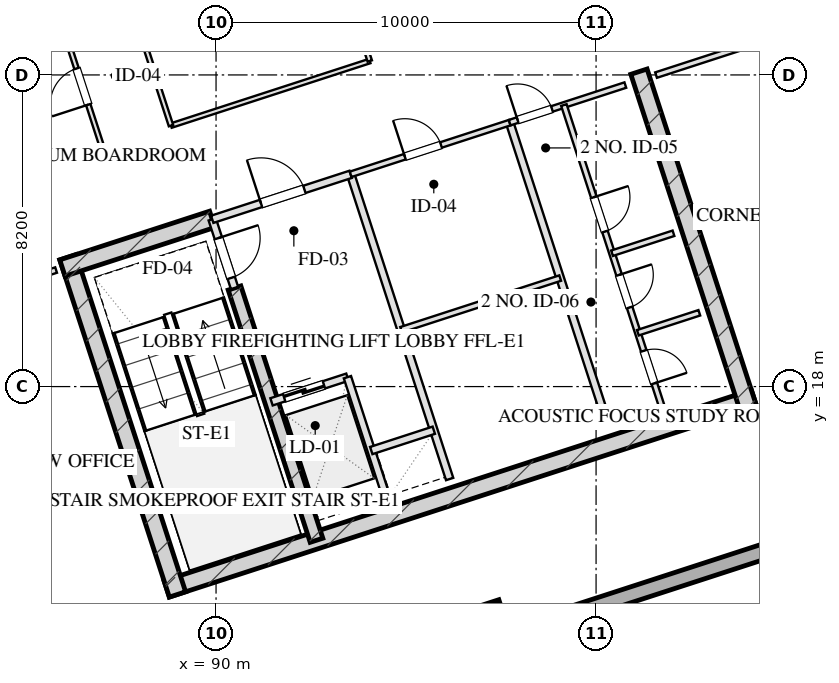
"""IFC4 building model, lengths in metres.
Left out: names, types, materials, properties, quantities, classifications, styles, units other than length and angle.
Written with IfcOpenShell. Run it as: python <this file> out.ifc"""

import sys

from ifc_helpers import new_model, si_unit, direction, frame, frame_2d, origin, origin_2d, place, context, subcontext, project, spatial, rectangle, hollow_rectangle, extrude, element, fill, save


model = new_model("IFC4")
c1 = context("Model", 3, precision=1e-05, world=origin(), true_north=direction((0.0, 1.0)))
c2 = subcontext(c1, "Body", "Model", "MODEL_VIEW")
j1 = project(units=[si_unit("LENGTHUNIT", "METRE"), si_unit("PLANEANGLEUNIT", "RADIAN")], contexts=[c1])
p1 = place(None, origin())
s1 = spatial("IfcSite", under=j1, at=p1, CompositionType="ELEMENT")
p2 = place(p1, origin())
s2 = spatial("IfcBuilding", under=s1, at=p2, CompositionType="ELEMENT")
p3 = place(p2, frame((0.0, 0.0, 192.05)))
s3 = spatial("IfcBuildingStorey", under=s2, at=p3, CompositionType="ELEMENT", Elevation=192.05)
p4 = place(p3, frame((88.701, 12.675, 0.0), z_axis=(0.0, 0.0, 1.0), x_axis=(0.95105824505, 0.309011673763, 0.0)))
e1 = element("IfcWall", 1, at=p4, inside=s3, PredefinedType="SHEAR", context=c2, shape_type="SweptSolid", body=[
    extrude(rectangle(XDim=16.25, YDim=0.45, at=frame_2d((8.125, 0.0))), origin(), (0.0, 0.0, 1.0), 3.45),
])
for number, where, z_axis, x_axis in (
    (2, (86.102, 21.404, 0.0), (0.0, 0.0, 1.0), (0.309, -0.951, 0.0)),
    (3, (101.128, 26.286, 0.0), (0.0, 0.0, 1.0), (0.309, -0.951, 0.0)),
):
    element("IfcWall", number, at=place(p3, frame(where, z_axis=z_axis, x_axis=x_axis)), inside=s3, PredefinedType="SHEAR", context=c2, shape_type="SweptSolid", body=[
        extrude(rectangle(XDim=9.33, YDim=0.45, at=frame_2d((4.665, 0.0))), origin(), (0.0, 0.0, 1.0), 3.45),
    ])
p5 = place(p3, frame((90.486, 20.594, 0.0), z_axis=(0.0, 0.0, 1.0), x_axis=(0.309020428229, -0.951055400562, 0.0)))
e4 = element("IfcWall", 4, at=p5, inside=s3, PredefinedType="SHEAR", context=c2, shape_type="SweptSolid", body=[
    extrude(rectangle(XDim=6.98, YDim=0.35, at=frame_2d((3.49, 0.0))), origin(), (0.0, 0.0, 1.0), 3.45),
])
p6 = place(p3, frame((85.957, 21.12, 0.0), z_axis=(0.0, 0.0, 1.0), x_axis=(0.951064796122, 0.308991510526, 0.0)))
e5 = element("IfcWall", 5, at=p6, inside=s3, PredefinedType="SHEAR", context=c2, shape_type="SweptSolid", body=[
    extrude(rectangle(XDim=4.145, YDim=0.45, at=frame_2d((2.073, 0.0))), origin(), (0.0, 0.0, 1.0), 3.45),
])
p7 = place(p3, frame((97.185, 11.888, 0.0), z_axis=(0.0, 0.0, 1.0), x_axis=(0.951056516295, 0.309016994375, 0.0)))
e6 = element("IfcColumn", 6, at=p7, inside=s3, PredefinedType="COLUMN", context=c2, shape_type="SweptSolid", body=[
    extrude(hollow_rectangle(XDim=0.8, YDim=0.8, WallThickness=0.028, at=origin_2d()), origin(), (0.0, 0.0, 1.0), 3.451),
])
p8 = place(p3, frame((98.224, 59.173, 0.0), z_axis=(0.0, 0.0, 1.0), x_axis=(0.309014228706, -0.951057414911, 0.0)))
e7 = element("IfcWall", 7, at=p8, inside=s3, PredefinedType="SOLIDWALL", context=c2, shape_type="SweptSolid", body=[
    extrude(rectangle(XDim=42.8, YDim=0.4, at=frame_2d((21.4, 0.0))), origin(), (0.0, 0.0, 1.0), 2.61),
])
p9 = place(p8, frame((26.75, 0.0, 0.75)))
e8 = element("IfcOpeningElement", 8, at=p9, cuts=e7, PredefinedType="OPENING", context=c2, shape_type="SweptSolid", body=[
    extrude(rectangle(XDim=2.1, YDim=1.46, at=frame_2d((1.05, 0.73))), frame((0.0, 0.21, 0.0), z_axis=(0.0, -1.0, 0.0), x_axis=(1.0, 0.0, 0.0)), (0.0, 0.0, 1.0), 0.42),
])
p10 = place(p8, frame((22.95, 0.0, 0.75)))
e9 = element("IfcOpeningElement", 9, at=p10, cuts=e7, PredefinedType="OPENING", context=c2, shape_type="SweptSolid", body=[
    extrude(rectangle(XDim=2.1, YDim=1.46, at=frame_2d((1.05, 0.73))), frame((0.0, 0.21, 0.0), z_axis=(0.0, -1.0, 0.0), x_axis=(1.0, 0.0, 0.0)), (0.0, 0.0, 1.0), 0.42),
])
p11 = place(p8, frame((17.75, 0.0, 0.75)))
e10 = element("IfcOpeningElement", 10, at=p11, cuts=e7, PredefinedType="OPENING", context=c2, shape_type="SweptSolid", body=[
    extrude(rectangle(XDim=2.1, YDim=1.46, at=frame_2d((1.05, 0.73))), frame((0.0, 0.21, 0.0), z_axis=(0.0, -1.0, 0.0), x_axis=(1.0, 0.0, 0.0)), (0.0, 0.0, 1.0), 0.42),
])
p12 = place(p8, frame((13.95, 0.0, 0.75)))
e11 = element("IfcOpeningElement", 11, at=p12, cuts=e7, PredefinedType="OPENING", context=c2, shape_type="SweptSolid", body=[
    extrude(rectangle(XDim=2.1, YDim=1.46, at=frame_2d((1.05, 0.73))), frame((0.0, 0.21, 0.0), z_axis=(0.0, -1.0, 0.0), x_axis=(1.0, 0.0, 0.0)), (0.0, 0.0, 1.0), 0.42),
])
p13 = place(p3, frame((109.908, 15.444, 0.0), z_axis=(0.0, 0.0, 1.0), x_axis=(-0.951057580055, -0.30901372044, 0.0)))
e12 = element("IfcWall", 12, at=p13, inside=s3, PredefinedType="SOLIDWALL", context=c2, shape_type="SweptSolid", body=[
    extrude(rectangle(XDim=26.4, YDim=0.4, at=frame_2d((13.2, 0.0))), origin(), (0.0, 0.0, 1.0), 2.61),
])
p14 = place(p3, frame((89.899, 22.401, 0.0), z_axis=(0.0, 0.0, 1.0), x_axis=(0.308932062672, -0.951084108086, 0.0)))
e13 = element("IfcWall", 13, at=p14, inside=s3, PredefinedType="PARTITIONING", context=c2, shape_type="SweptSolid", body=[
    extrude(rectangle(XDim=1.9, YDim=0.2, at=frame_2d((0.95, 0.0))), origin(), (0.0, 0.0, 1.0), 3.175),
])
p15 = place(p14, frame((0.52, 0.0, 0.0)))
e14 = element("IfcOpeningElement", 14, at=p15, cuts=e13, PredefinedType="OPENING", context=c2, shape_type="SweptSolid", body=[
    extrude(rectangle(XDim=1.1, YDim=2.05, at=frame_2d((0.55, 1.025))), frame((0.0, 0.11, 0.0), z_axis=(0.0, -1.0, 0.0), x_axis=(1.0, 0.0, 0.0)), (0.0, 0.0, 1.0), 0.22),
])
p16 = place(p3, frame((93.542, 23.585, 0.0), z_axis=(0.0, 0.0, 1.0), x_axis=(0.309042196757, -0.951048327176, 0.0)))
e15 = element("IfcWall", 15, at=p16, inside=s3, PredefinedType="PARTITIONING", context=c2, shape_type="SweptSolid", body=[
    extrude(rectangle(XDim=8.43, YDim=0.2, at=frame_2d((4.215, 0.0))), origin(), (0.0, 0.0, 1.0), 3.175),
])
p17 = place(p3, frame((89.899, 22.401, 0.0), z_axis=(0.0, 0.0, 1.0), x_axis=(0.951046716504, 0.309047153403, 0.0)))
e16 = element("IfcWall", 16, at=p17, inside=s3, PredefinedType="PARTITIONING", context=c2, shape_type="SweptSolid", body=[
    extrude(rectangle(XDim=3.83, YDim=0.2, at=frame_2d((1.915, 0.0))), origin(), (0.0, 0.0, 1.0), 3.175),
])
p18 = place(p17, frame((1.35, 0.0, 0.0)))
e17 = element("IfcOpeningElement", 17, at=p18, cuts=e16, PredefinedType="OPENING", context=c2, shape_type="SweptSolid", body=[
    extrude(rectangle(XDim=1.2, YDim=2.05, at=frame_2d((0.6, 1.025))), frame((0.0, 0.11, 0.0), z_axis=(0.0, -1.0, 0.0), x_axis=(1.0, 0.0, 0.0)), (0.0, 0.0, 1.0), 0.22),
])
p19 = place(p3, frame((91.46, 17.598, 0.0), z_axis=(0.0, 0.0, 1.0), x_axis=(0.951062257173, 0.308999325213, 0.0)))
e18 = element("IfcWall", 18, at=p19, inside=s3, PredefinedType="PARTITIONING", context=c2, shape_type="SweptSolid", body=[
    extrude(rectangle(XDim=2.1, YDim=0.2, at=frame_2d((1.05, 0.0))), origin(), (0.0, 0.0, 1.0), 3.175),
])
p20 = place(p19, frame((0.35, 0.0, 0.0)))
e19 = element("IfcOpeningElement", 19, at=p20, cuts=e18, PredefinedType="OPENING", context=c2, shape_type="SweptSolid", body=[
    extrude(rectangle(XDim=1.1, YDim=2.05, at=frame_2d((0.55, 1.025))), frame((0.0, 0.11, 0.0), z_axis=(0.0, -1.0, 0.0), x_axis=(1.0, 0.0, 0.0)), (0.0, 0.0, 1.0), 0.22),
])
p21 = place(p3, frame((93.457, 18.247, 0.0), z_axis=(0.0, 0.0, 1.0), x_axis=(0.3089935693, -0.951064127245, 0.0)))
e20 = element("IfcWall", 20, at=p21, inside=s3, PredefinedType="PARTITIONING", context=c2, shape_type="SweptSolid", body=[
    extrude(rectangle(XDim=3.7, YDim=0.2, at=frame_2d((1.85, 0.0))), origin(), (0.0, 0.0, 1.0), 3.175),
])
p22 = place(p3, frame((94.084, 16.317, 0.0), z_axis=(0.0, 0.0, 1.0), x_axis=(0.951041328149, 0.309063734775, 0.0)))
e21 = element("IfcWall", 21, at=p22, inside=s3, PredefinedType="PARTITIONING", context=c2, shape_type="SweptSolid", body=[
    extrude(rectangle(XDim=1.73, YDim=0.2, at=frame_2d((0.865, 0.0))), origin(), (0.0, 0.0, 1.0), 3.175),
])
p23 = place(p3, frame((97.727, 24.944, 0.0), z_axis=(0.0, 0.0, 1.0), x_axis=(0.309016001439, -0.951056838919, 0.0)))
e22 = element("IfcWall", 22, at=p23, inside=s3, PredefinedType="PARTITIONING", context=c2, shape_type="SweptSolid", body=[
    extrude(rectangle(XDim=8.43, YDim=0.2, at=frame_2d((4.215, 0.0))), origin(), (0.0, 0.0, 1.0), 3.175),
])
p24 = place(p3, frame((93.542, 23.585, 0.0), z_axis=(0.0, 0.0, 1.0), x_axis=(0.951063829732, 0.308994485023, 0.0)))
e23 = element("IfcWall", 23, at=p24, inside=s3, PredefinedType="PARTITIONING", context=c2, shape_type="SweptSolid", body=[
    extrude(rectangle(XDim=4.4, YDim=0.15, at=frame_2d((2.2, 0.0))), origin(), (0.0, 0.0, 1.0), 3.175),
])
p25 = place(p24, frame((1.5, 0.0, 0.0)))
e24 = element("IfcOpeningElement", 24, at=p25, cuts=e23, PredefinedType="OPENING", context=c2, shape_type="SweptSolid", body=[
    extrude(rectangle(XDim=1.0, YDim=2.05, at=frame_2d((0.5, 1.025))), frame((0.0, 0.085, 0.0), z_axis=(0.0, -1.0, 0.0), x_axis=(1.0, 0.0, 0.0)), (0.0, 0.0, 1.0), 0.17),
])
p26 = place(p3, frame((94.871, 19.495, 0.0), z_axis=(0.0, 0.0, 1.0), x_axis=(0.951042223598, 0.309060979314, 0.0)))
e25 = element("IfcWall", 25, at=p26, inside=s3, PredefinedType="PARTITIONING", context=c2, shape_type="SweptSolid", body=[
    extrude(rectangle(XDim=4.4, YDim=0.15, at=frame_2d((2.2, 0.0))), origin(), (0.0, 0.0, 1.0), 3.175),
])
p27 = place(p3, frame((97.727, 24.944, 0.0), z_axis=(0.0, 0.0, 1.0), x_axis=(0.951036872128, 0.309077446369, 0.0)))
e26 = element("IfcWall", 26, at=p27, inside=s3, PredefinedType="PARTITIONING", context=c2, shape_type="SweptSolid", body=[
    extrude(rectangle(XDim=3.2, YDim=0.15, at=frame_2d((1.6, 0.0))), origin(), (0.0, 0.0, 1.0), 3.175),
])
p28 = place(p27, frame((0.22, 0.0, 0.0)))
e27 = element("IfcOpeningElement", 27, at=p28, cuts=e26, PredefinedType="OPENING", context=c2, shape_type="SweptSolid", body=[
    extrude(rectangle(XDim=0.95, YDim=2.05, at=frame_2d((0.475, 1.025))), frame((0.0, 0.085, 0.0), z_axis=(0.0, -1.0, 0.0), x_axis=(1.0, 0.0, 0.0)), (0.0, 0.0, 1.0), 0.17),
])
p29 = place(p3, frame((99.153, 25.408, 0.0), z_axis=(0.0, 0.0, 1.0), x_axis=(0.309016001439, -0.951056838919, 0.0)))
e28 = element("IfcWall", 28, at=p29, inside=s3, PredefinedType="PARTITIONING", context=c2, shape_type="SweptSolid", body=[
    extrude(rectangle(XDim=8.43, YDim=0.15, at=frame_2d((4.215, 0.0))), origin(), (0.0, 0.0, 1.0), 3.175),
])
p30 = place(p29, frame((2.55, 0.0, 0.0)))
e29 = element("IfcOpeningElement", 29, at=p30, cuts=e28, PredefinedType="OPENING", context=c2, shape_type="SweptSolid", body=[
    extrude(rectangle(XDim=0.95, YDim=2.05, at=frame_2d((0.475, 1.025))), frame((0.0, 0.085, 0.0), z_axis=(0.0, -1.0, 0.0), x_axis=(1.0, 0.0, 0.0)), (0.0, 0.0, 1.0), 0.17),
])
p31 = place(p29, frame((4.7, 0.0, 0.0)))
e30 = element("IfcOpeningElement", 30, at=p31, cuts=e28, PredefinedType="OPENING", context=c2, shape_type="SweptSolid", body=[
    extrude(rectangle(XDim=0.9, YDim=2.05, at=frame_2d((0.45, 1.025))), frame((0.0, 0.085, 0.0), z_axis=(0.0, -1.0, 0.0), x_axis=(1.0, 0.0, 0.0)), (0.0, 0.0, 1.0), 0.17),
])
p32 = place(p29, frame((6.8, 0.0, 0.0)))
e31 = element("IfcOpeningElement", 31, at=p32, cuts=e28, PredefinedType="OPENING", context=c2, shape_type="SweptSolid", body=[
    extrude(rectangle(XDim=0.9, YDim=2.05, at=frame_2d((0.45, 1.025))), frame((0.0, 0.085, 0.0), z_axis=(0.0, -1.0, 0.0), x_axis=(1.0, 0.0, 0.0)), (0.0, 0.0, 1.0), 0.17),
])
p33 = place(p3, frame((100.42, 21.509, 0.0), z_axis=(0.0, 0.0, 1.0), x_axis=(0.951040401051, 0.309066587596, 0.0)))
e32 = element("IfcWall", 32, at=p33, inside=s3, PredefinedType="PARTITIONING", context=c2, shape_type="SweptSolid", body=[
    extrude(rectangle(XDim=1.7, YDim=0.15, at=frame_2d((0.85, 0.0))), origin(), (0.0, 0.0, 1.0), 3.175),
])
p34 = place(p3, frame((101.1, 19.416, 0.0), z_axis=(0.0, 0.0, 1.0), x_axis=(0.951054116971, 0.309024378638, 0.0)))
e33 = element("IfcWall", 33, at=p34, inside=s3, PredefinedType="PARTITIONING", context=c2, shape_type="SweptSolid", body=[
    extrude(rectangle(XDim=1.7, YDim=0.15, at=frame_2d((0.85, 0.0))), origin(), (0.0, 0.0, 1.0), 3.175),
])
p35 = place(p3, frame((78.753, 18.78, 0.0), z_axis=(0.0, 0.0, 1.0), x_axis=(0.951060977215, 0.309003264738, 0.0)))
e34 = element("IfcWall", 34, at=p35, inside=s3, PredefinedType="PARTITIONING", context=c2, shape_type="SweptSolid", body=[
    extrude(rectangle(XDim=7.4, YDim=0.15, at=frame_2d((3.7, 0.0))), origin(), (0.0, 0.0, 1.0), 3.175),
])
p36 = place(p35, frame((3.108, 0.0, 0.0)))
e35 = element("IfcOpeningElement", 35, at=p36, cuts=e34, PredefinedType="OPENING", context=c2, shape_type="SweptSolid", body=[
    extrude(rectangle(XDim=1.0, YDim=2.05, at=frame_2d((0.5, 1.025))), frame((0.0, 0.085, 0.0), z_axis=(0.0, -1.0, 0.0), x_axis=(1.0, 0.0, 0.0)), (0.0, 0.0, 1.0), 0.17),
])
p37 = place(p3, frame((101.578, 26.196, 0.0), z_axis=(0.0, 0.0, 1.0), x_axis=(0.951064934653, 0.308991084134, 0.0)))
e36 = element("IfcWall", 36, at=p37, inside=s3, PredefinedType="PARTITIONING", context=c2, shape_type="SweptSolid", body=[
    extrude(rectangle(XDim=6.8, YDim=0.15, at=frame_2d((3.4, 0.0))), origin(), (0.0, 0.0, 1.0), 3.175),
])
p38 = place(p37, frame((2.856, 0.0, 0.0)))
e37 = element("IfcOpeningElement", 37, at=p38, cuts=e36, PredefinedType="OPENING", context=c2, shape_type="SweptSolid", body=[
    extrude(rectangle(XDim=1.05, YDim=2.05, at=frame_2d((0.525, 1.025))), frame((0.0, 0.085, 0.0), z_axis=(0.0, -1.0, 0.0), x_axis=(1.0, 0.0, 0.0)), (0.0, 0.0, 1.0), 0.17),
])
p39 = place(p3, frame((77.925, 21.328, 0.0), z_axis=(0.0, 0.0, 1.0), x_axis=(0.951053980838, 0.309024797601, 0.0)))
e38 = element("IfcWall", 38, at=p39, inside=s3, PredefinedType="PARTITIONING", context=c2, shape_type="SweptSolid", body=[
    extrude(rectangle(XDim=9.55, YDim=0.12, at=frame_2d((4.775, 0.0))), origin(), (0.0, 0.0, 1.0), 3.175),
])
p40 = place(p3, frame((88.814, 24.867, 0.0), z_axis=(0.0, 0.0, 1.0), x_axis=(0.951061793147, 0.309000753423, 0.0)))
e39 = element("IfcWall", 39, at=p40, inside=s3, PredefinedType="PARTITIONING", context=c2, shape_type="SweptSolid", body=[
    extrude(rectangle(XDim=5.5, YDim=0.12, at=frame_2d((2.75, 0.0))), origin(), (0.0, 0.0, 1.0), 3.175),
])
p41 = place(p3, frame((87.007, 24.28, 0.0), z_axis=(0.0, 0.0, 1.0), x_axis=(-0.309022042254, 0.951054876125, 0.0)))
e40 = element("IfcWall", 40, at=p41, inside=s3, PredefinedType="PARTITIONING", context=c2, shape_type="SweptSolid", body=[
    extrude(rectangle(XDim=16.64, YDim=0.12, at=frame_2d((8.32, 0.0))), origin(), (0.0, 0.0, 1.0), 3.175),
])
p42 = place(p41, frame((1.197, 0.0, 0.0)))
e41 = element("IfcOpeningElement", 41, at=p42, cuts=e40, PredefinedType="OPENING", context=c2, shape_type="SweptSolid", body=[
    extrude(rectangle(XDim=1.0, YDim=2.05, at=frame_2d((0.5, 1.025))), frame((0.0, 0.07, 0.0), z_axis=(0.0, -1.0, 0.0), x_axis=(1.0, 0.0, 0.0)), (0.0, 0.0, 1.0), 0.14),
])
p43 = place(p41, frame((4.891, 0.0, 0.0)))
e42 = element("IfcOpeningElement", 42, at=p43, cuts=e40, PredefinedType="OPENING", context=c2, shape_type="SweptSolid", body=[
    extrude(rectangle(XDim=0.85, YDim=2.05, at=frame_2d((0.425, 1.025))), frame((0.0, 0.07, 0.0), z_axis=(0.0, -1.0, 0.0), x_axis=(1.0, 0.0, 0.0)), (0.0, 0.0, 1.0), 0.14),
])
p44 = place(p41, frame((9.354, 0.0, 0.0)))
e43 = element("IfcOpeningElement", 43, at=p44, cuts=e40, PredefinedType="OPENING", context=c2, shape_type="SweptSolid", body=[
    extrude(rectangle(XDim=1.0, YDim=2.05, at=frame_2d((0.5, 1.025))), frame((0.0, 0.07, 0.0), z_axis=(0.0, -1.0, 0.0), x_axis=(1.0, 0.0, 0.0)), (0.0, 0.0, 1.0), 0.14),
])
p45 = place(p41, frame((13.98, 0.0, 0.0)))
e44 = element("IfcOpeningElement", 44, at=p45, cuts=e40, PredefinedType="OPENING", context=c2, shape_type="SweptSolid", body=[
    extrude(rectangle(XDim=1.0, YDim=2.05, at=frame_2d((0.5, 1.025))), frame((0.0, 0.07, 0.0), z_axis=(0.0, -1.0, 0.0), x_axis=(1.0, 0.0, 0.0)), (0.0, 0.0, 1.0), 0.14),
])
p46 = place(p3, frame((88.814, 24.867, 0.0), z_axis=(0.0, 0.0, 1.0), x_axis=(-0.309022042254, 0.951054876125, 0.0)))
e45 = element("IfcWall", 45, at=p46, inside=s3, PredefinedType="PARTITIONING", context=c2, shape_type="SweptSolid", body=[
    extrude(rectangle(XDim=16.64, YDim=0.12, at=frame_2d((8.32, 0.0))), origin(), (0.0, 0.0, 1.0), 3.175),
])
p47 = place(p46, frame((3.438, 0.0, 0.0)))
e46 = element("IfcOpeningElement", 46, at=p47, cuts=e45, PredefinedType="OPENING", context=c2, shape_type="SweptSolid", body=[
    extrude(rectangle(XDim=1.1, YDim=2.05, at=frame_2d((0.55, 1.025))), frame((0.0, 0.07, 0.0), z_axis=(0.0, -1.0, 0.0), x_axis=(1.0, 0.0, 0.0)), (0.0, 0.0, 1.0), 0.14),
])
p48 = place(p46, frame((11.69, 0.0, 0.0)))
e47 = element("IfcOpeningElement", 47, at=p48, cuts=e45, PredefinedType="OPENING", context=c2, shape_type="SweptSolid", body=[
    extrude(rectangle(XDim=1.1, YDim=2.05, at=frame_2d((0.55, 1.025))), frame((0.0, 0.07, 0.0), z_axis=(0.0, -1.0, 0.0), x_axis=(1.0, 0.0, 0.0)), (0.0, 0.0, 1.0), 0.14),
])
p49 = place(p3, frame((94.045, 26.566, 0.0), z_axis=(0.0, 0.0, 1.0), x_axis=(-0.30901773025, 0.951056277195, 0.0)))
e48 = element("IfcWall", 48, at=p49, inside=s3, PredefinedType="PARTITIONING", context=c2, shape_type="SweptSolid", body=[
    extrude(rectangle(XDim=16.64, YDim=0.12, at=frame_2d((8.32, 0.0))), origin(), (0.0, 0.0, 1.0), 3.175),
])
p50 = place(p3, frame((76.876, 24.557, 0.0), z_axis=(0.0, 0.0, 1.0), x_axis=(0.951056422073, 0.309017284359, 0.0)))
e49 = element("IfcWall", 49, at=p50, inside=s3, PredefinedType="PARTITIONING", context=c2, shape_type="SweptSolid", body=[
    extrude(rectangle(XDim=9.55, YDim=0.12, at=frame_2d((4.775, 0.0))), origin(), (0.0, 0.0, 1.0), 3.175),
])
p51 = place(p15, origin())
e50 = element("IfcDoor", 50, at=p51, inside=s3, OperationType="SINGLE_SWING_LEFT", PredefinedType="DOOR", context=c2, shape_type="SweptSolid", body=[
    extrude(rectangle(XDim=1.1, YDim=2.05, at=frame_2d((0.55, 1.025))), frame((0.0, 0.025, 0.0), z_axis=(0.0, -1.0, 0.0), x_axis=(1.0, 0.0, 0.0)), (0.0, 0.0, 1.0), 0.05),
])
fill(e14, e50)
p52 = place(p18, origin())
e51 = element("IfcDoor", 51, at=p52, inside=s3, OperationType="SINGLE_SWING_LEFT", PredefinedType="DOOR", context=c2, shape_type="SweptSolid", body=[
    extrude(rectangle(XDim=1.2, YDim=2.05, at=frame_2d((0.6, 1.025))), frame((0.0, 0.025, 0.0), z_axis=(0.0, -1.0, 0.0), x_axis=(1.0, 0.0, 0.0)), (0.0, 0.0, 1.0), 0.05),
])
fill(e17, e51)
p53 = place(p20, origin())
e52 = element("IfcDoor", 52, at=p53, inside=s3, OperationType="DOUBLE_DOOR_SLIDING", PredefinedType="DOOR", context=c2, shape_type="SweptSolid", body=[
    extrude(rectangle(XDim=1.1, YDim=2.05, at=frame_2d((0.55, 1.025))), frame((0.0, 0.025, 0.0), z_axis=(0.0, -1.0, 0.0), x_axis=(1.0, 0.0, 0.0)), (0.0, 0.0, 1.0), 0.05),
])
fill(e19, e52)
p54 = place(p25, origin())
e53 = element("IfcDoor", 53, at=p54, inside=s3, OperationType="SINGLE_SWING_LEFT", PredefinedType="DOOR", context=c2, shape_type="SweptSolid", body=[
    extrude(rectangle(XDim=1.0, YDim=2.05, at=frame_2d((0.5, 1.025))), frame((0.0, 0.025, 0.0), z_axis=(0.0, -1.0, 0.0), x_axis=(1.0, 0.0, 0.0)), (0.0, 0.0, 1.0), 0.05),
])
fill(e24, e53)
p55 = place(p28, origin())
e54 = element("IfcDoor", 54, at=p55, inside=s3, OperationType="SINGLE_SWING_LEFT", PredefinedType="DOOR", context=c2, shape_type="SweptSolid", body=[
    extrude(rectangle(XDim=0.95, YDim=2.05, at=frame_2d((0.475, 1.025))), frame((0.0, 0.025, 0.0), z_axis=(0.0, -1.0, 0.0), x_axis=(1.0, 0.0, 0.0)), (0.0, 0.0, 1.0), 0.05),
])
fill(e27, e54)
p56 = place(p30, origin())
e55 = element("IfcDoor", 55, at=p56, inside=s3, OperationType="SINGLE_SWING_LEFT", PredefinedType="DOOR", context=c2, shape_type="SweptSolid", body=[
    extrude(rectangle(XDim=0.95, YDim=2.05, at=frame_2d((0.475, 1.025))), frame((0.0, 0.025, 0.0), z_axis=(0.0, -1.0, 0.0), x_axis=(1.0, 0.0, 0.0)), (0.0, 0.0, 1.0), 0.05),
])
fill(e29, e55)
p57 = place(p31, origin())
e56 = element("IfcDoor", 56, at=p57, inside=s3, OperationType="SINGLE_SWING_LEFT", PredefinedType="DOOR", context=c2, shape_type="SweptSolid", body=[
    extrude(rectangle(XDim=0.9, YDim=2.05, at=frame_2d((0.45, 1.025))), frame((0.0, 0.025, 0.0), z_axis=(0.0, -1.0, 0.0), x_axis=(1.0, 0.0, 0.0)), (0.0, 0.0, 1.0), 0.05),
])
fill(e30, e56)
p58 = place(p32, origin())
e57 = element("IfcDoor", 57, at=p58, inside=s3, OperationType="SINGLE_SWING_RIGHT", PredefinedType="DOOR", context=c2, shape_type="SweptSolid", body=[
    extrude(rectangle(XDim=0.9, YDim=2.05, at=frame_2d((0.45, 1.025))), frame((0.0, 0.025, 0.0), z_axis=(0.0, -1.0, 0.0), x_axis=(1.0, 0.0, 0.0)), (0.0, 0.0, 1.0), 0.05),
])
fill(e31, e57)
p59 = place(p42, origin())
e58 = element("IfcDoor", 58, at=p59, inside=s3, OperationType="SINGLE_SWING_LEFT", PredefinedType="DOOR", context=c2, shape_type="SweptSolid", body=[
    extrude(rectangle(XDim=1.0, YDim=2.05, at=frame_2d((0.5, 1.025))), frame((0.0, 0.025, 0.0), z_axis=(0.0, -1.0, 0.0), x_axis=(1.0, 0.0, 0.0)), (0.0, 0.0, 1.0), 0.05),
])
fill(e41, e58)
save(model, sys.argv[1])
